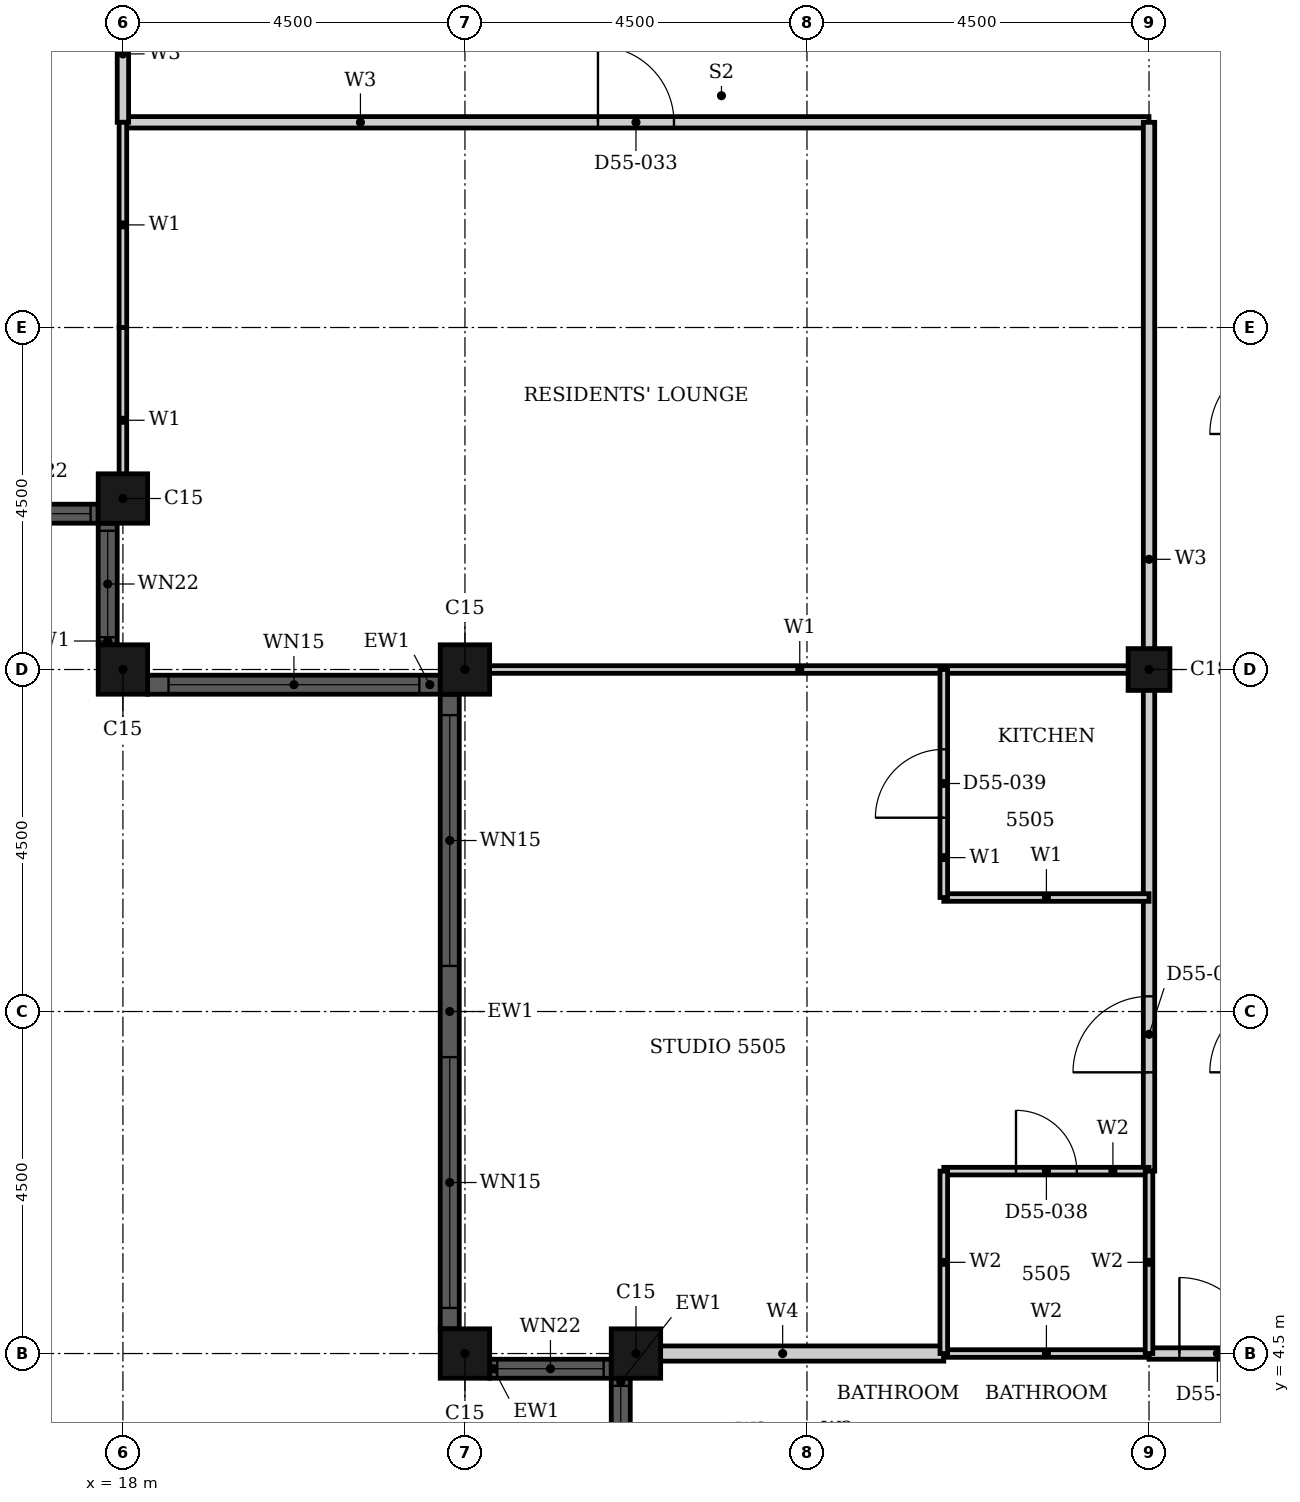
"""IFC4 building model, lengths in metres.
Left out: names, types, materials, properties, quantities, classifications, styles, units other than length and angle.
Written with IfcOpenShell. Run it as: python <this file> out.ifc"""

import sys

from ifc_helpers import new_model, si_unit, direction, frame, frame_2d, origin, origin_2d, place, context, subcontext, project, spatial, rectangle, hollow_rectangle, extrude, element, fill, save


model = new_model("IFC4")
c1 = context("Model", 3, precision=1e-05, world=origin(), true_north=direction((0.0, 1.0)))
c2 = subcontext(c1, "Body", "Model", "MODEL_VIEW")
j1 = project(units=[si_unit("LENGTHUNIT", "METRE"), si_unit("PLANEANGLEUNIT", "RADIAN")], contexts=[c1])
p1 = place(None, origin())
s1 = spatial("IfcSite", under=j1, at=p1, CompositionType="ELEMENT")
p2 = place(p1, origin())
s2 = spatial("IfcBuilding", under=s1, at=p2, CompositionType="ELEMENT")
p3 = place(p2, frame((0.0, 0.0, 218.3)))
s3 = spatial("IfcBuildingStorey", under=s2, at=p3, CompositionType="ELEMENT", Elevation=218.3)
for number, where, z_axis, x_axis in (
    (1, (18.0, 15.75, 0.0), (0.0, 0.0, 1.0), (1.0, 0.0, 0.0)),
    (2, (18.0, 13.5, 0.0), (0.0, 0.0, 1.0), (1.0, 0.0, 0.0)),
    (3, (22.5, 13.5, 0.0), (0.0, 0.0, 1.0), (1.0, 0.0, 0.0)),
    (4, (22.5, 4.5, 0.0), (0.0, 0.0, 1.0), (1.0, 0.0, 0.0)),
    (5, (24.75, 4.5, 0.0), (0.0, 0.0, 1.0), (1.0, 0.0, 0.0)),
):
    element("IfcColumn", number, at=place(p3, frame(where, z_axis=z_axis, x_axis=x_axis)), inside=s3, PredefinedType="COLUMN", context=c2, shape_type="SweptSolid", body=[
        extrude(hollow_rectangle(XDim=0.65, YDim=0.65, WallThickness=0.021, at=origin_2d()), origin(), (0.0, 0.0, 1.0), 3.7),
    ])
p4 = place(p3, frame((31.5, 13.5, 0.0), z_axis=(0.0, 0.0, 1.0), x_axis=(1.0, 0.0, 0.0)))
e6 = element("IfcColumn", 6, at=p4, inside=s3, PredefinedType="COLUMN", context=c2, shape_type="SweptSolid", body=[
    extrude(hollow_rectangle(XDim=0.55, YDim=0.55, WallThickness=0.018, at=origin_2d()), origin(), (0.0, 0.0, 1.0), 3.7),
])
p5 = place(p3, frame((16.075, 15.55, 0.0), z_axis=(0.0, 0.0, 1.0), x_axis=(1.0, 0.0, 0.0)))
e7 = element("IfcWall", 7, at=p5, inside=s3, PredefinedType="SOLIDWALL", context=c2, shape_type="SweptSolid", body=[
    extrude(rectangle(XDim=1.6, YDim=0.25, at=frame_2d((0.8, 0.0))), origin(), (0.0, 0.0, 1.0), 3.7),
])
p6 = place(p5, frame((0.1, 0.0, 0.9)))
e8 = element("IfcOpeningElement", 8, at=p6, cuts=e7, PredefinedType="OPENING", context=c2, shape_type="SweptSolid", body=[
    extrude(rectangle(XDim=1.4, YDim=1.85, at=frame_2d((0.7, 0.925))), frame((0.0, 0.135, 0.0), z_axis=(0.0, -1.0, 0.0), x_axis=(1.0, 0.0, 0.0)), (0.0, 0.0, 1.0), 0.27),
])
p7 = place(p3, frame((17.8, 15.425, 0.0), z_axis=(0.0, 0.0, 1.0), x_axis=(0.0, -1.0, 0.0)))
e9 = element("IfcWall", 9, at=p7, inside=s3, PredefinedType="SOLIDWALL", context=c2, shape_type="SweptSolid", body=[
    extrude(rectangle(XDim=1.6, YDim=0.25, at=frame_2d((0.8, 0.0))), origin(), (0.0, 0.0, 1.0), 3.7),
])
p8 = place(p7, frame((0.1, 0.0, 0.9)))
e10 = element("IfcOpeningElement", 10, at=p8, cuts=e9, PredefinedType="OPENING", context=c2, shape_type="SweptSolid", body=[
    extrude(rectangle(XDim=1.4, YDim=1.85, at=frame_2d((0.7, 0.925))), frame((0.0, 0.135, 0.0), z_axis=(0.0, -1.0, 0.0), x_axis=(1.0, 0.0, 0.0)), (0.0, 0.0, 1.0), 0.27),
])
p9 = place(p3, frame((18.325, 13.3, 0.0), z_axis=(0.0, 0.0, 1.0), x_axis=(1.0, 0.0, 0.0)))
e11 = element("IfcWall", 11, at=p9, inside=s3, PredefinedType="SOLIDWALL", context=c2, shape_type="SweptSolid", body=[
    extrude(rectangle(XDim=3.85, YDim=0.25, at=frame_2d((1.925, 0.0))), origin(), (0.0, 0.0, 1.0), 3.7),
])
p10 = place(p9, frame((0.275, 0.0, 0.45)))
e12 = element("IfcOpeningElement", 12, at=p10, cuts=e11, PredefinedType="OPENING", context=c2, shape_type="SweptSolid", body=[
    extrude(rectangle(XDim=3.3, YDim=2.3, at=frame_2d((1.65, 1.15))), frame((0.0, 0.135, 0.0), z_axis=(0.0, -1.0, 0.0), x_axis=(1.0, 0.0, 0.0)), (0.0, 0.0, 1.0), 0.27),
])
p11 = place(p3, frame((22.3, 13.175, 0.0), z_axis=(0.0, 0.0, 1.0), x_axis=(0.0, -1.0, 0.0)))
e13 = element("IfcWall", 13, at=p11, inside=s3, PredefinedType="SOLIDWALL", context=c2, shape_type="SweptSolid", body=[
    extrude(rectangle(XDim=8.35, YDim=0.25, at=frame_2d((4.175, 0.0))), origin(), (0.0, 0.0, 1.0), 3.7),
])
p12 = place(p11, frame((0.275, 0.0, 0.45)))
e14 = element("IfcOpeningElement", 14, at=p12, cuts=e13, PredefinedType="OPENING", context=c2, shape_type="SweptSolid", body=[
    extrude(rectangle(XDim=3.3, YDim=2.3, at=frame_2d((1.65, 1.15))), frame((0.0, 0.135, 0.0), z_axis=(0.0, -1.0, 0.0), x_axis=(1.0, 0.0, 0.0)), (0.0, 0.0, 1.0), 0.27),
])
p13 = place(p11, frame((4.775, 0.0, 0.45)))
e15 = element("IfcOpeningElement", 15, at=p13, cuts=e13, PredefinedType="OPENING", context=c2, shape_type="SweptSolid", body=[
    extrude(rectangle(XDim=3.3, YDim=2.3, at=frame_2d((1.65, 1.15))), frame((0.0, 0.135, 0.0), z_axis=(0.0, -1.0, 0.0), x_axis=(1.0, 0.0, 0.0)), (0.0, 0.0, 1.0), 0.27),
])
p14 = place(p3, frame((22.825, 4.3, 0.0), z_axis=(0.0, 0.0, 1.0), x_axis=(1.0, 0.0, 0.0)))
e16 = element("IfcWall", 16, at=p14, inside=s3, PredefinedType="SOLIDWALL", context=c2, shape_type="SweptSolid", body=[
    extrude(rectangle(XDim=1.6, YDim=0.25, at=frame_2d((0.8, 0.0))), origin(), (0.0, 0.0, 1.0), 3.7),
])
p15 = place(p14, frame((0.1, 0.0, 0.9)))
e17 = element("IfcOpeningElement", 17, at=p15, cuts=e16, PredefinedType="OPENING", context=c2, shape_type="SweptSolid", body=[
    extrude(rectangle(XDim=1.4, YDim=1.85, at=frame_2d((0.7, 0.925))), frame((0.0, 0.135, 0.0), z_axis=(0.0, -1.0, 0.0), x_axis=(1.0, 0.0, 0.0)), (0.0, 0.0, 1.0), 0.27),
])
p16 = place(p3, frame((24.55, 4.175, 0.0), z_axis=(0.0, 0.0, 1.0), x_axis=(0.0, -1.0, 0.0)))
e18 = element("IfcWall", 18, at=p16, inside=s3, PredefinedType="SOLIDWALL", context=c2, shape_type="SweptSolid", body=[
    extrude(rectangle(XDim=1.6, YDim=0.25, at=frame_2d((0.8, 0.0))), origin(), (0.0, 0.0, 1.0), 3.7),
])
p17 = place(p16, frame((0.1, 0.0, 0.9)))
e19 = element("IfcOpeningElement", 19, at=p17, cuts=e18, PredefinedType="OPENING", context=c2, shape_type="SweptSolid", body=[
    extrude(rectangle(XDim=1.4, YDim=1.85, at=frame_2d((0.7, 0.925))), frame((0.0, 0.135, 0.0), z_axis=(0.0, -1.0, 0.0), x_axis=(1.0, 0.0, 0.0)), (0.0, 0.0, 1.0), 0.27),
])
p18 = place(p3, frame((18.0, 20.7, 0.0), z_axis=(0.0, 0.0, 1.0), x_axis=(1.0, 0.0, 0.0)))
e20 = element("IfcWall", 20, at=p18, inside=s3, PredefinedType="PARTITIONING", context=c2, shape_type="SweptSolid", body=[
    extrude(rectangle(XDim=13.5, YDim=0.15, at=frame_2d((6.75, 0.0))), origin(), (0.0, 0.0, 1.0), 3.4),
])
p19 = place(p18, frame((6.25, 0.0, 0.0)))
e21 = element("IfcOpeningElement", 21, at=p19, cuts=e20, PredefinedType="OPENING", context=c2, shape_type="SweptSolid", body=[
    extrude(rectangle(XDim=1.0, YDim=2.1, at=frame_2d((0.5, 1.05))), frame((0.0, 0.085, 0.0), z_axis=(0.0, -1.0, 0.0), x_axis=(1.0, 0.0, 0.0)), (0.0, 0.0, 1.0), 0.17),
])
p20 = place(p3, frame((31.5, 4.5, 0.0), z_axis=(0.0, 0.0, 1.0), x_axis=(1.0, 0.0, 0.0)))
e22 = element("IfcWall", 22, at=p20, inside=s3, PredefinedType="PARTITIONING", context=c2, shape_type="SweptSolid", body=[
    extrude(rectangle(XDim=1.8, YDim=0.15, at=frame_2d((0.9, 0.0))), origin(), (0.0, 0.0, 1.0), 3.4),
])
p21 = place(p20, frame((0.4, 0.0, 0.0)))
e23 = element("IfcOpeningElement", 23, at=p21, cuts=e22, PredefinedType="OPENING", context=c2, shape_type="SweptSolid", body=[
    extrude(rectangle(XDim=1.0, YDim=2.2, at=frame_2d((0.5, 1.1))), frame((0.0, 0.085, 0.0), z_axis=(0.0, -1.0, 0.0), x_axis=(1.0, 0.0, 0.0)), (0.0, 0.0, 1.0), 0.17),
])
p22 = place(p3, frame((18.0, 20.7, 0.0), z_axis=(0.0, 0.0, 1.0), x_axis=(0.0, 1.0, 0.0)))
e24 = element("IfcWall", 24, at=p22, inside=s3, PredefinedType="PARTITIONING", context=c2, shape_type="SweptSolid", body=[
    extrude(rectangle(XDim=1.8, YDim=0.15, at=frame_2d((0.9, 0.0))), origin(), (0.0, 0.0, 1.0), 3.4),
])
p23 = place(p3, frame((31.5, 6.9, 0.0), z_axis=(0.0, 0.0, 1.0), x_axis=(0.0, 1.0, 0.0)))
e25 = element("IfcWall", 25, at=p23, inside=s3, PredefinedType="PARTITIONING", context=c2, shape_type="SweptSolid", body=[
    extrude(rectangle(XDim=13.8, YDim=0.15, at=frame_2d((6.9, 0.0))), origin(), (0.0, 0.0, 1.0), 2.68),
])
p24 = place(p23, frame((1.3, 0.0, 0.0)))
e26 = element("IfcOpeningElement", 26, at=p24, cuts=e25, PredefinedType="OPENING", context=c2, shape_type="SweptSolid", body=[
    extrude(rectangle(XDim=1.0, YDim=2.2, at=frame_2d((0.5, 1.1))), frame((0.0, 0.085, 0.0), z_axis=(0.0, -1.0, 0.0), x_axis=(1.0, 0.0, 0.0)), (0.0, 0.0, 1.0), 0.17),
])
p25 = place(p3, frame((28.8, 10.5, 0.0), z_axis=(0.0, 0.0, 1.0), x_axis=(1.0, 0.0, 0.0)))
e27 = element("IfcWall", 27, at=p25, inside=s3, PredefinedType="PARTITIONING", context=c2, shape_type="SweptSolid", body=[
    extrude(rectangle(XDim=2.7, YDim=0.1, at=frame_2d((1.35, 0.0))), origin(), (0.0, 0.0, 1.0), 3.4),
])
p26 = place(p3, frame((22.31, 13.5, 0.0), z_axis=(0.0, 0.0, 1.0), x_axis=(1.0, 0.0, 0.0)))
e28 = element("IfcWall", 28, at=p26, inside=s3, PredefinedType="PARTITIONING", context=c2, shape_type="SweptSolid", body=[
    extrude(rectangle(XDim=9.19, YDim=0.1, at=frame_2d((4.595, 0.0))), origin(), (0.0, 0.0, 1.0), 2.48),
])
p27 = place(p3, frame((18.0, 15.56, 0.0), z_axis=(0.0, 0.0, 1.0), x_axis=(0.0, 1.0, 0.0)))
e29 = element("IfcWall", 29, at=p27, inside=s3, PredefinedType="PARTITIONING", context=c2, shape_type="SweptSolid", body=[
    extrude(rectangle(XDim=2.439, YDim=0.1, at=frame_2d((1.219, 0.0))), origin(), (0.0, 0.0, 1.0), 3.4),
])
p28 = place(p3, frame((18.0, 18.0, 0.0), z_axis=(0.0, 0.0, 1.0), x_axis=(0.0, 1.0, 0.0)))
e30 = element("IfcWall", 30, at=p28, inside=s3, PredefinedType="PARTITIONING", context=c2, shape_type="SweptSolid", body=[
    extrude(rectangle(XDim=2.7, YDim=0.1, at=frame_2d((1.35, 0.0))), origin(), (0.0, 0.0, 1.0), 3.4),
])
p29 = place(p3, frame((28.8, 10.5, 0.0), z_axis=(0.0, 0.0, 1.0), x_axis=(0.0, 1.0, 0.0)))
e31 = element("IfcWall", 31, at=p29, inside=s3, PredefinedType="PARTITIONING", context=c2, shape_type="SweptSolid", body=[
    extrude(rectangle(XDim=3.0, YDim=0.1, at=frame_2d((1.5, 0.0))), origin(), (0.0, 0.0, 1.0), 3.4),
])
p30 = place(p29, frame((1.05, 0.0, 0.0)))
e32 = element("IfcOpeningElement", 32, at=p30, cuts=e31, PredefinedType="OPENING", context=c2, shape_type="SweptSolid", body=[
    extrude(rectangle(XDim=0.9, YDim=2.1, at=frame_2d((0.45, 1.05))), frame((0.0, 0.06, 0.0), z_axis=(0.0, -1.0, 0.0), x_axis=(1.0, 0.0, 0.0)), (0.0, 0.0, 1.0), 0.12),
])
p31 = place(p3, frame((24.56, 4.5, 0.0), z_axis=(0.0, 0.0, 1.0), x_axis=(1.0, 0.0, 0.0)))
e33 = element("IfcWall", 33, at=p31, inside=s3, PredefinedType="PARTITIONING", context=c2, shape_type="SweptSolid", body=[
    extrude(rectangle(XDim=4.24, YDim=0.2, at=frame_2d((2.12, 0.0))), origin(), (0.0, 0.0, 1.0), 3.4),
])
p32 = place(p3, frame((28.8, 4.5, 0.0), z_axis=(0.0, 0.0, 1.0), x_axis=(1.0, 0.0, 0.0)))
e34 = element("IfcWall", 34, at=p32, inside=s3, PredefinedType="PARTITIONING", context=c2, shape_type="SweptSolid", body=[
    extrude(rectangle(XDim=2.7, YDim=0.1, at=frame_2d((1.35, 0.0))), origin(), (0.0, 0.0, 1.0), 3.4),
])
p33 = place(p3, frame((28.8, 6.9, 0.0), z_axis=(0.0, 0.0, 1.0), x_axis=(1.0, 0.0, 0.0)))
e35 = element("IfcWall", 35, at=p33, inside=s3, PredefinedType="PARTITIONING", context=c2, shape_type="SweptSolid", body=[
    extrude(rectangle(XDim=2.7, YDim=0.1, at=frame_2d((1.35, 0.0))), origin(), (0.0, 0.0, 1.0), 3.4),
])
p34 = place(p33, frame((0.95, 0.0, 0.0)))
e36 = element("IfcOpeningElement", 36, at=p34, cuts=e35, PredefinedType="OPENING", context=c2, shape_type="SweptSolid", body=[
    extrude(rectangle(XDim=0.8, YDim=2.1, at=frame_2d((0.4, 1.05))), frame((0.0, 0.06, 0.0), z_axis=(0.0, -1.0, 0.0), x_axis=(1.0, 0.0, 0.0)), (0.0, 0.0, 1.0), 0.12),
])
p35 = place(p3, frame((28.8, 4.5, 0.0), z_axis=(0.0, 0.0, 1.0), x_axis=(0.0, 1.0, 0.0)))
e37 = element("IfcWall", 37, at=p35, inside=s3, PredefinedType="PARTITIONING", context=c2, shape_type="SweptSolid", body=[
    extrude(rectangle(XDim=2.4, YDim=0.1, at=frame_2d((1.2, 0.0))), origin(), (0.0, 0.0, 1.0), 3.4),
])
p36 = place(p3, frame((31.5, 4.5, 0.0), z_axis=(0.0, 0.0, 1.0), x_axis=(0.0, 1.0, 0.0)))
e38 = element("IfcWall", 38, at=p36, inside=s3, PredefinedType="PARTITIONING", context=c2, shape_type="SweptSolid", body=[
    extrude(rectangle(XDim=2.4, YDim=0.1, at=frame_2d((1.2, 0.0))), origin(), (0.0, 0.0, 1.0), 2.68),
])
p37 = place(p6, origin())
e39 = element("IfcWindow", 39, at=p37, inside=s3, PartitioningType="SINGLE_PANEL", PredefinedType="WINDOW", context=c2, shape_type="SweptSolid", body=[
    extrude(rectangle(XDim=1.4, YDim=1.85, at=frame_2d((0.7, 0.925))), frame((0.0, 0.03, 0.0), z_axis=(0.0, -1.0, 0.0), x_axis=(1.0, 0.0, 0.0)), (0.0, 0.0, 1.0), 0.06),
])
fill(e8, e39)
p38 = place(p8, origin())
e40 = element("IfcWindow", 40, at=p38, inside=s3, PartitioningType="SINGLE_PANEL", PredefinedType="WINDOW", context=c2, shape_type="SweptSolid", body=[
    extrude(rectangle(XDim=1.4, YDim=1.85, at=frame_2d((0.7, 0.925))), frame((0.0, 0.03, 0.0), z_axis=(0.0, -1.0, 0.0), x_axis=(1.0, 0.0, 0.0)), (0.0, 0.0, 1.0), 0.06),
])
fill(e10, e40)
p39 = place(p10, origin())
e41 = element("IfcWindow", 41, at=p39, inside=s3, PartitioningType="SINGLE_PANEL", PredefinedType="WINDOW", context=c2, shape_type="SweptSolid", body=[
    extrude(rectangle(XDim=3.3, YDim=2.3, at=frame_2d((1.65, 1.15))), frame((0.0, 0.03, 0.0), z_axis=(0.0, -1.0, 0.0), x_axis=(1.0, 0.0, 0.0)), (0.0, 0.0, 1.0), 0.06),
])
fill(e12, e41)
p40 = place(p12, origin())
e42 = element("IfcWindow", 42, at=p40, inside=s3, PartitioningType="SINGLE_PANEL", PredefinedType="WINDOW", context=c2, shape_type="SweptSolid", body=[
    extrude(rectangle(XDim=3.3, YDim=2.3, at=frame_2d((1.65, 1.15))), frame((0.0, 0.03, 0.0), z_axis=(0.0, -1.0, 0.0), x_axis=(1.0, 0.0, 0.0)), (0.0, 0.0, 1.0), 0.06),
])
fill(e14, e42)
p41 = place(p13, origin())
e43 = element("IfcWindow", 43, at=p41, inside=s3, PartitioningType="SINGLE_PANEL", PredefinedType="WINDOW", context=c2, shape_type="SweptSolid", body=[
    extrude(rectangle(XDim=3.3, YDim=2.3, at=frame_2d((1.65, 1.15))), frame((0.0, 0.03, 0.0), z_axis=(0.0, -1.0, 0.0), x_axis=(1.0, 0.0, 0.0)), (0.0, 0.0, 1.0), 0.06),
])
fill(e15, e43)
p42 = place(p15, origin())
e44 = element("IfcWindow", 44, at=p42, inside=s3, PartitioningType="SINGLE_PANEL", PredefinedType="WINDOW", context=c2, shape_type="SweptSolid", body=[
    extrude(rectangle(XDim=1.4, YDim=1.85, at=frame_2d((0.7, 0.925))), frame((0.0, 0.03, 0.0), z_axis=(0.0, -1.0, 0.0), x_axis=(1.0, 0.0, 0.0)), (0.0, 0.0, 1.0), 0.06),
])
fill(e17, e44)
p43 = place(p17, origin())
e45 = element("IfcWindow", 45, at=p43, inside=s3, PartitioningType="SINGLE_PANEL", PredefinedType="WINDOW", context=c2, shape_type="SweptSolid", body=[
    extrude(rectangle(XDim=1.4, YDim=1.85, at=frame_2d((0.7, 0.925))), frame((0.0, 0.03, 0.0), z_axis=(0.0, -1.0, 0.0), x_axis=(1.0, 0.0, 0.0)), (0.0, 0.0, 1.0), 0.06),
])
fill(e19, e45)
p44 = place(p19, origin())
e46 = element("IfcDoor", 46, at=p44, inside=s3, OperationType="SINGLE_SWING_LEFT", PredefinedType="DOOR", context=c2, shape_type="SweptSolid", body=[
    extrude(rectangle(XDim=1.0, YDim=2.1, at=frame_2d((0.5, 1.05))), frame((0.0, 0.025, 0.0), z_axis=(0.0, -1.0, 0.0), x_axis=(1.0, 0.0, 0.0)), (0.0, 0.0, 1.0), 0.05),
])
fill(e21, e46)
p45 = place(p24, origin())
e47 = element("IfcDoor", 47, at=p45, inside=s3, OperationType="SINGLE_SWING_RIGHT", PredefinedType="DOOR", context=c2, shape_type="SweptSolid", body=[
    extrude(rectangle(XDim=1.0, YDim=2.2, at=frame_2d((0.5, 1.1))), frame((0.0, 0.025, 0.0), z_axis=(0.0, -1.0, 0.0), x_axis=(1.0, 0.0, 0.0)), (0.0, 0.0, 1.0), 0.05),
])
fill(e26, e47)
p46 = place(p34, origin())
e48 = element("IfcDoor", 48, at=p46, inside=s3, OperationType="SINGLE_SWING_LEFT", PredefinedType="DOOR", context=c2, shape_type="SweptSolid", body=[
    extrude(rectangle(XDim=0.8, YDim=2.1, at=frame_2d((0.4, 1.05))), frame((0.0, 0.025, 0.0), z_axis=(0.0, -1.0, 0.0), x_axis=(1.0, 0.0, 0.0)), (0.0, 0.0, 1.0), 0.05),
])
fill(e36, e48)
p47 = place(p30, origin())
e49 = element("IfcDoor", 49, at=p47, inside=s3, OperationType="SINGLE_SWING_LEFT", PredefinedType="DOOR", context=c2, shape_type="SweptSolid", body=[
    extrude(rectangle(XDim=0.9, YDim=2.1, at=frame_2d((0.45, 1.05))), frame((0.0, 0.025, 0.0), z_axis=(0.0, -1.0, 0.0), x_axis=(1.0, 0.0, 0.0)), (0.0, 0.0, 1.0), 0.05),
])
fill(e32, e49)
p48 = place(p21, origin())
e50 = element("IfcDoor", 50, at=p48, inside=s3, OperationType="SINGLE_SWING_LEFT", PredefinedType="DOOR", context=c2, shape_type="SweptSolid", body=[
    extrude(rectangle(XDim=1.0, YDim=2.2, at=frame_2d((0.5, 1.1))), frame((0.0, 0.025, 0.0), z_axis=(0.0, -1.0, 0.0), x_axis=(1.0, 0.0, 0.0)), (0.0, 0.0, 1.0), 0.05),
])
fill(e23, e50)
save(model, sys.argv[1])
